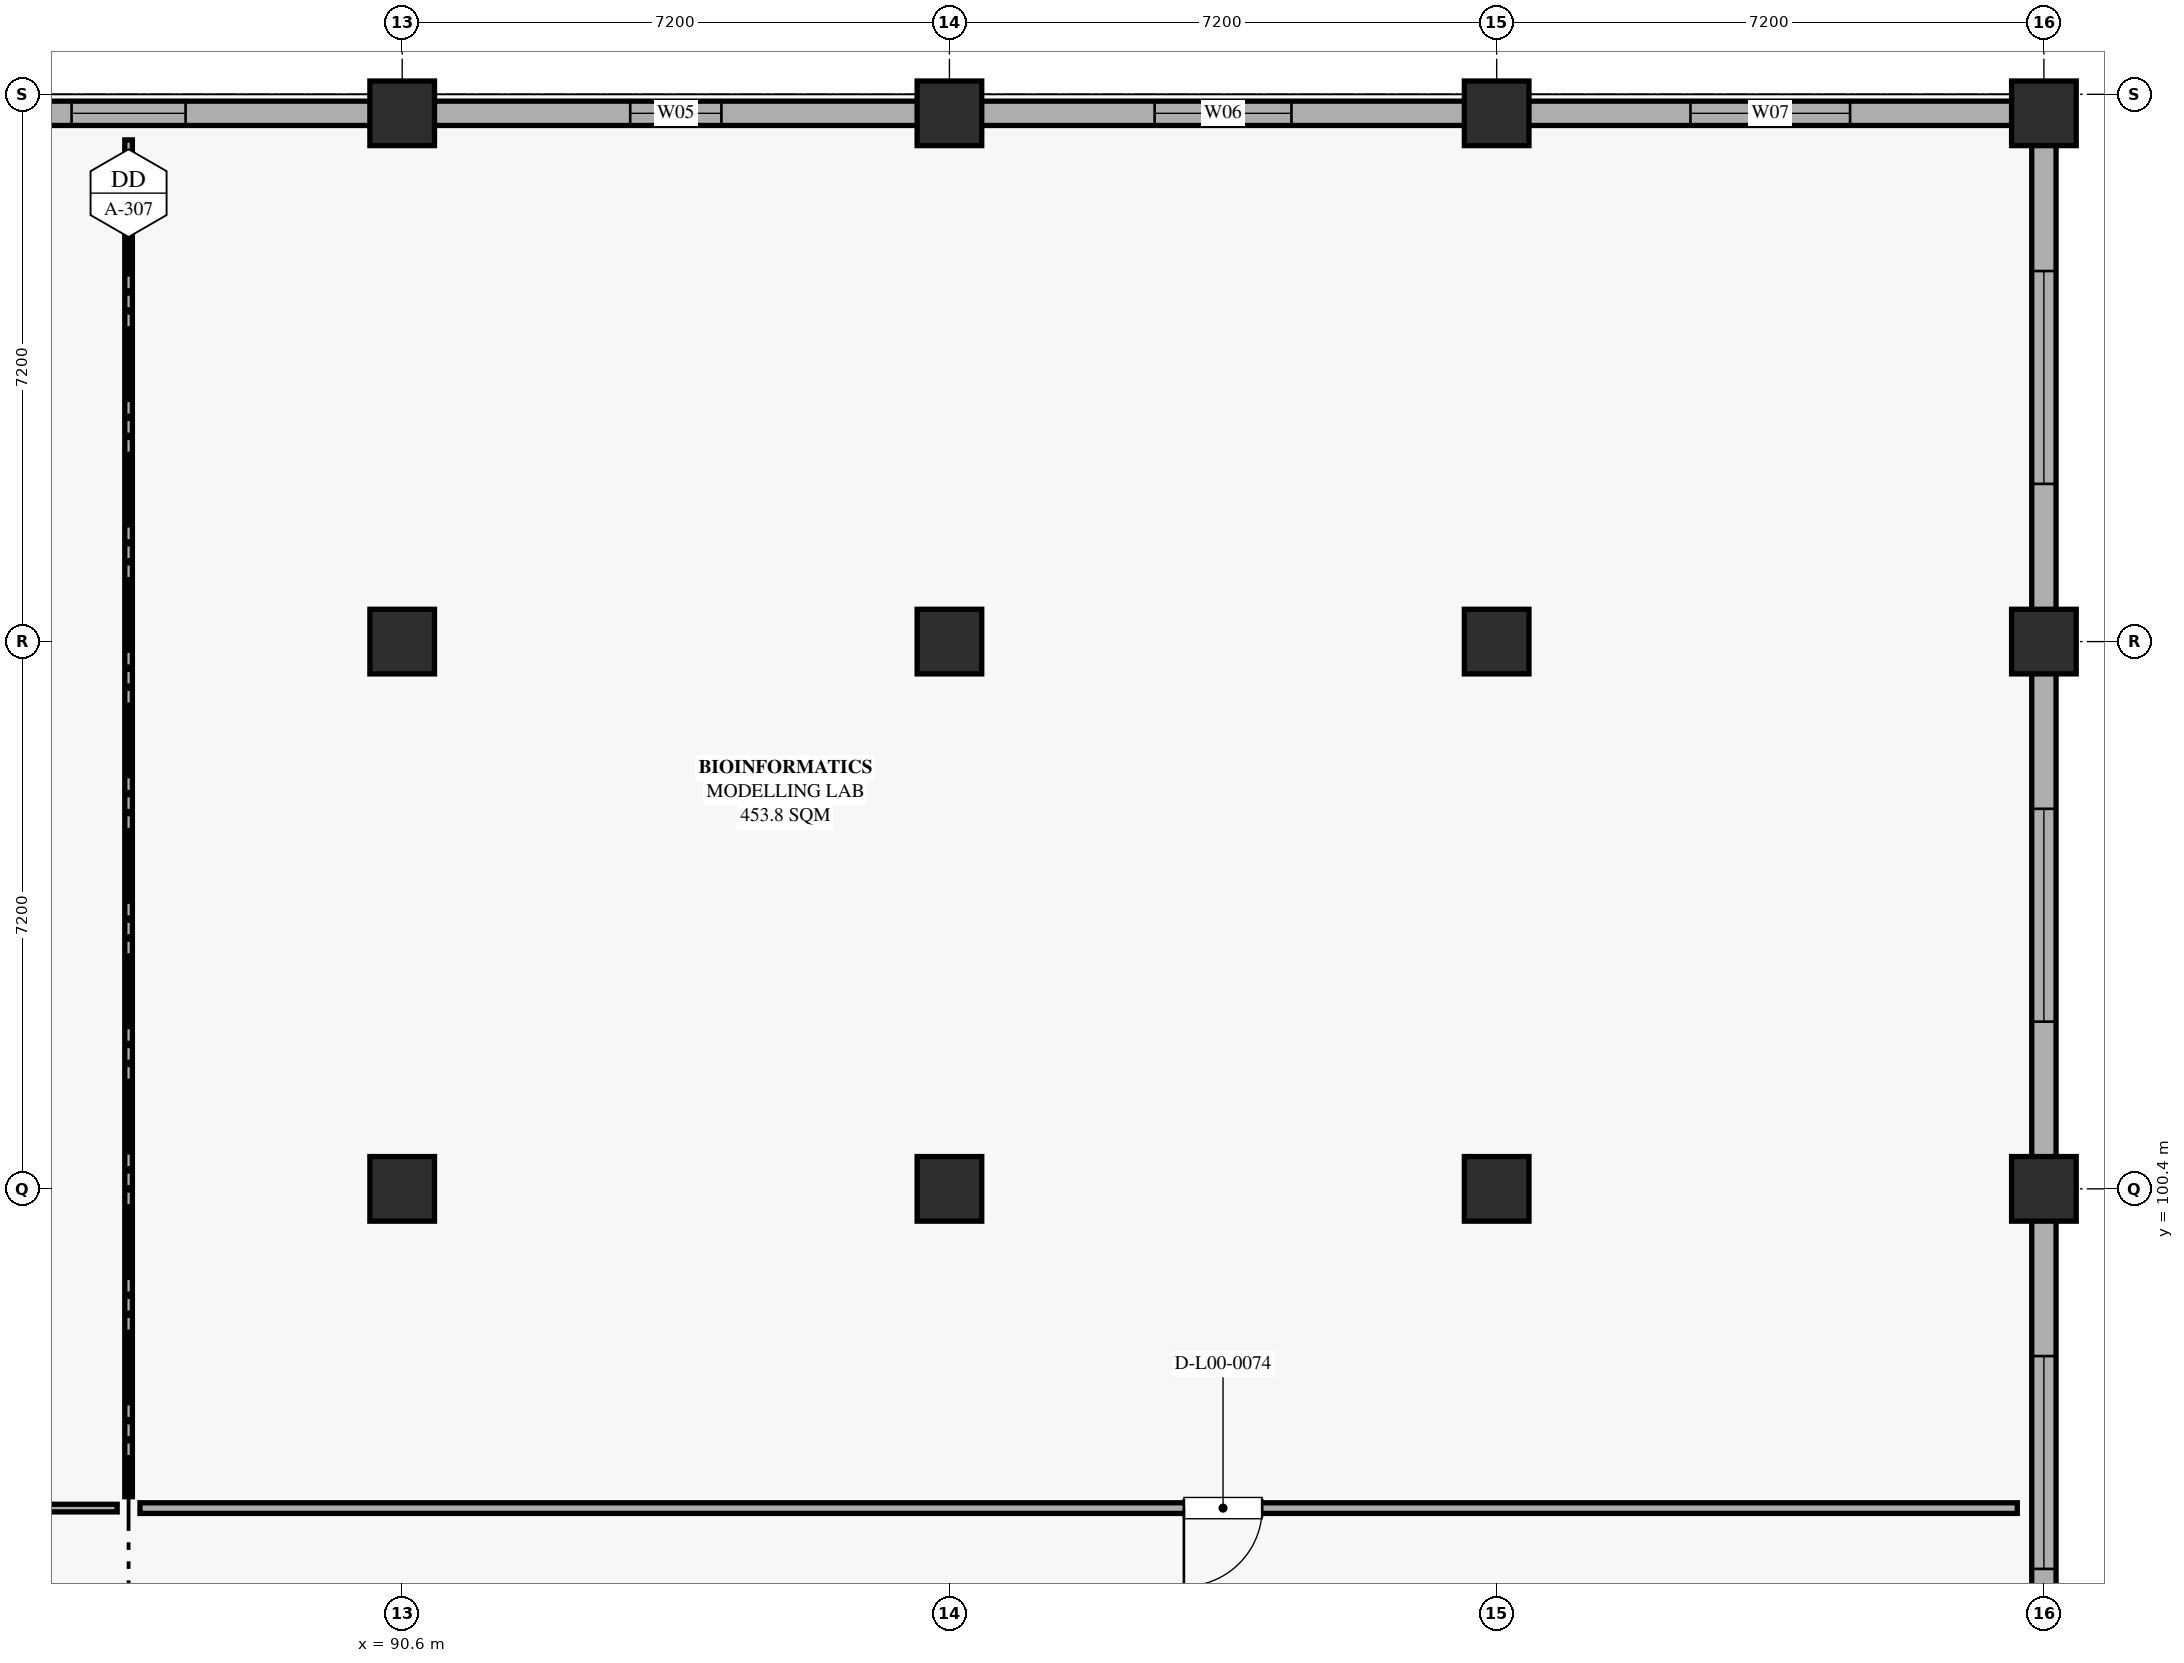
"""IFC4 building model, lengths in metres.
Left out: names, types, materials, properties, quantities, classifications, styles, units other than length and angle.
Written with IfcOpenShell. Run it as: python <this file> out.ifc"""

import sys

from ifc_helpers import new_model, si_unit, direction, frame, frame_2d, origin, origin_2d, place, context, subcontext, project, spatial, rectangle, extrude, element, fill, save


model = new_model("IFC4")
c1 = context("Model", 3, precision=1e-05, world=origin(), true_north=direction((0.0, 1.0)))
c2 = subcontext(c1, "Body", "Model", "MODEL_VIEW")
j1 = project(units=[si_unit("LENGTHUNIT", "METRE"), si_unit("PLANEANGLEUNIT", "RADIAN")], contexts=[c1])
p1 = place(None, origin())
s1 = spatial("IfcSite", under=j1, at=p1, CompositionType="ELEMENT")
p2 = place(p1, origin())
s2 = spatial("IfcBuilding", under=s1, at=p2, CompositionType="ELEMENT")
p3 = place(p2, origin())
s3 = spatial("IfcBuildingStorey", under=s2, at=p3, CompositionType="ELEMENT", Elevation=0.0)
for number, where, z_axis, x_axis in (
    (1, (90.6, 100.4, 0.0), (0.0, 0.0, 1.0), (1.0, 0.0, 0.0)),
    (2, (97.8, 100.4, 0.0), (0.0, 0.0, 1.0), (1.0, 0.0, 0.0)),
    (3, (105.0, 100.4, 0.0), (0.0, 0.0, 1.0), (1.0, 0.0, 0.0)),
    (4, (112.2, 100.4, 0.0), (0.0, 0.0, 1.0), (1.0, 0.0, 0.0)),
    (5, (90.6, 107.6, 0.0), (0.0, 0.0, 1.0), (1.0, 0.0, 0.0)),
    (6, (97.8, 107.6, 0.0), (0.0, 0.0, 1.0), (1.0, 0.0, 0.0)),
    (7, (105.0, 107.6, 0.0), (0.0, 0.0, 1.0), (1.0, 0.0, 0.0)),
    (8, (112.2, 107.6, 0.0), (0.0, 0.0, 1.0), (1.0, 0.0, 0.0)),
    (9, (90.6, 114.55, 0.0), (0.0, 0.0, 1.0), (1.0, 0.0, 0.0)),
    (10, (97.8, 114.55, 0.0), (0.0, 0.0, 1.0), (1.0, 0.0, 0.0)),
    (11, (105.0, 114.55, 0.0), (0.0, 0.0, 1.0), (1.0, 0.0, 0.0)),
    (12, (112.2, 114.55, 0.0), (0.0, 0.0, 1.0), (1.0, 0.0, 0.0)),
):
    element("IfcColumn", number, at=place(p3, frame(where, z_axis=z_axis, x_axis=x_axis)), inside=s3, PredefinedType="COLUMN", context=c2, shape_type="SweptSolid", body=[
        extrude(rectangle(XDim=0.85, YDim=0.85, at=origin_2d()), origin(), (0.0, 0.0, 1.0), 5.4),
    ])
p4 = place(p3, frame((112.2, 99.99, 0.0), z_axis=(0.0, 0.0, 1.0), x_axis=(0.0, -1.0, 0.0)))
e13 = element("IfcWall", 13, at=p4, inside=s3, PredefinedType="SOLIDWALL", context=c2, shape_type="SweptSolid", body=[
    extrude(rectangle(XDim=6.38, YDim=0.32, at=frame_2d((3.19, 0.0))), origin(), (0.0, 0.0, 1.0), 3.9),
])
p5 = place(p4, frame((1.79, 0.0, 0.9)))
e14 = element("IfcOpeningElement", 14, at=p5, cuts=e13, PredefinedType="OPENING", context=c2, shape_type="SweptSolid", body=[
    extrude(rectangle(XDim=2.8, YDim=2.2, at=frame_2d((1.4, 1.1))), frame((0.0, 0.17, 0.0), z_axis=(0.0, -1.0, 0.0), x_axis=(1.0, 0.0, 0.0)), (0.0, 0.0, 1.0), 0.34),
])
p6 = place(p3, frame((112.2, 107.19, 0.0), z_axis=(0.0, 0.0, 1.0), x_axis=(0.0, -1.0, 0.0)))
e15 = element("IfcWall", 15, at=p6, inside=s3, PredefinedType="SOLIDWALL", context=c2, shape_type="SweptSolid", body=[
    extrude(rectangle(XDim=6.38, YDim=0.32, at=frame_2d((3.19, 0.0))), origin(), (0.0, 0.0, 1.0), 3.9),
])
p7 = place(p6, frame((1.79, 0.0, 0.9)))
e16 = element("IfcOpeningElement", 16, at=p7, cuts=e15, PredefinedType="OPENING", context=c2, shape_type="SweptSolid", body=[
    extrude(rectangle(XDim=2.8, YDim=2.2, at=frame_2d((1.4, 1.1))), frame((0.0, 0.17, 0.0), z_axis=(0.0, -1.0, 0.0), x_axis=(1.0, 0.0, 0.0)), (0.0, 0.0, 1.0), 0.34),
])
p8 = place(p3, frame((112.2, 114.14, 0.0), z_axis=(0.0, 0.0, 1.0), x_axis=(0.0, -1.0, 0.0)))
e17 = element("IfcWall", 17, at=p8, inside=s3, PredefinedType="SOLIDWALL", context=c2, shape_type="SweptSolid", body=[
    extrude(rectangle(XDim=6.13, YDim=0.32, at=frame_2d((3.065, 0.0))), origin(), (0.0, 0.0, 1.0), 3.9),
])
p9 = place(p8, frame((1.665, 0.0, 0.9)))
e18 = element("IfcOpeningElement", 18, at=p9, cuts=e17, PredefinedType="OPENING", context=c2, shape_type="SweptSolid", body=[
    extrude(rectangle(XDim=2.8, YDim=2.2, at=frame_2d((1.4, 1.1))), frame((0.0, 0.17, 0.0), z_axis=(0.0, -1.0, 0.0), x_axis=(1.0, 0.0, 0.0)), (0.0, 0.0, 1.0), 0.34),
])
p10 = place(p3, frame((83.81, 114.55, 0.0), z_axis=(0.0, 0.0, 1.0), x_axis=(1.0, 0.0, 0.0)))
e19 = element("IfcWall", 19, at=p10, inside=s3, PredefinedType="SOLIDWALL", context=c2, shape_type="SweptSolid", body=[
    extrude(rectangle(XDim=6.38, YDim=0.32, at=frame_2d((3.19, 0.0))), origin(), (0.0, 0.0, 1.0), 3.9),
])
p11 = place(p10, frame((2.44, 0.0, 0.9)))
e20 = element("IfcOpeningElement", 20, at=p11, cuts=e19, PredefinedType="OPENING", context=c2, shape_type="SweptSolid", body=[
    extrude(rectangle(XDim=1.5, YDim=2.4, at=frame_2d((0.75, 1.2))), frame((0.0, 0.17, 0.0), z_axis=(0.0, -1.0, 0.0), x_axis=(1.0, 0.0, 0.0)), (0.0, 0.0, 1.0), 0.34),
])
p12 = place(p3, frame((91.01, 114.55, 0.0), z_axis=(0.0, 0.0, 1.0), x_axis=(1.0, 0.0, 0.0)))
e21 = element("IfcWall", 21, at=p12, inside=s3, PredefinedType="SOLIDWALL", context=c2, shape_type="SweptSolid", body=[
    extrude(rectangle(XDim=6.38, YDim=0.32, at=frame_2d((3.19, 0.0))), origin(), (0.0, 0.0, 1.0), 3.9),
])
p13 = place(p12, frame((2.59, 0.0, 0.9)))
e22 = element("IfcOpeningElement", 22, at=p13, cuts=e21, PredefinedType="OPENING", context=c2, shape_type="SweptSolid", body=[
    extrude(rectangle(XDim=1.2, YDim=2.4, at=frame_2d((0.6, 1.2))), frame((0.0, 0.17, 0.0), z_axis=(0.0, -1.0, 0.0), x_axis=(1.0, 0.0, 0.0)), (0.0, 0.0, 1.0), 0.34),
])
p14 = place(p3, frame((98.21, 114.55, 0.0), z_axis=(0.0, 0.0, 1.0), x_axis=(1.0, 0.0, 0.0)))
e23 = element("IfcWall", 23, at=p14, inside=s3, PredefinedType="SOLIDWALL", context=c2, shape_type="SweptSolid", body=[
    extrude(rectangle(XDim=6.38, YDim=0.32, at=frame_2d((3.19, 0.0))), origin(), (0.0, 0.0, 1.0), 3.9),
])
p15 = place(p14, frame((2.29, 0.0, 0.9)))
e24 = element("IfcOpeningElement", 24, at=p15, cuts=e23, PredefinedType="OPENING", context=c2, shape_type="SweptSolid", body=[
    extrude(rectangle(XDim=1.8, YDim=2.1, at=frame_2d((0.9, 1.05))), frame((0.0, 0.17, 0.0), z_axis=(0.0, -1.0, 0.0), x_axis=(1.0, 0.0, 0.0)), (0.0, 0.0, 1.0), 0.34),
])
p16 = place(p3, frame((105.41, 114.55, 0.0), z_axis=(0.0, 0.0, 1.0), x_axis=(1.0, 0.0, 0.0)))
e25 = element("IfcWall", 25, at=p16, inside=s3, PredefinedType="SOLIDWALL", context=c2, shape_type="SweptSolid", body=[
    extrude(rectangle(XDim=6.38, YDim=0.32, at=frame_2d((3.19, 0.0))), origin(), (0.0, 0.0, 1.0), 3.9),
])
p17 = place(p16, frame((2.14, 0.0, 0.9)))
e26 = element("IfcOpeningElement", 26, at=p17, cuts=e25, PredefinedType="OPENING", context=c2, shape_type="SweptSolid", body=[
    extrude(rectangle(XDim=2.1, YDim=2.1, at=frame_2d((1.05, 1.05))), frame((0.0, 0.17, 0.0), z_axis=(0.0, -1.0, 0.0), x_axis=(1.0, 0.0, 0.0)), (0.0, 0.0, 1.0), 0.34),
])
p18 = place(p3, frame((86.85, 96.2, 0.0), z_axis=(0.0, 0.0, 1.0), x_axis=(-1.0, 0.0, 0.0)))
e27 = element("IfcWall", 27, at=p18, inside=s3, PredefinedType="PARTITIONING", context=c2, shape_type="SweptSolid", body=[
    extrude(rectangle(XDim=24.7, YDim=0.1, at=frame_2d((12.35, 0.0))), origin(), (0.0, 0.0, 1.0), 3.88),
])
p19 = place(p18, frame((13.735, 0.0, 0.0)))
e28 = element("IfcOpeningElement", 28, at=p19, cuts=e27, PredefinedType="OPENING", context=c2, shape_type="SweptSolid", body=[
    extrude(rectangle(XDim=1.03, YDim=2.16, at=frame_2d((0.515, 1.08))), frame((0.0, 0.06, 0.0), z_axis=(0.0, -1.0, 0.0), x_axis=(1.0, 0.0, 0.0)), (0.0, 0.0, 1.0), 0.12),
])
p20 = place(p3, frame((87.0, 114.2, 0.0), z_axis=(0.0, 0.0, 1.0), x_axis=(0.0, -1.0, 0.0)))
e29 = element("IfcWall", 29, at=p20, inside=s3, PredefinedType="PARTITIONING", context=c2, shape_type="SweptSolid", body=[
    extrude(rectangle(XDim=17.85, YDim=0.1, at=frame_2d((8.925, 0.0))), origin(), (0.0, 0.0, 1.0), 3.88),
])
p21 = place(p3, frame((111.85, 96.2, 0.0), z_axis=(0.0, 0.0, 1.0), x_axis=(-1.0, 0.0, 0.0)))
e30 = element("IfcWall", 30, at=p21, inside=s3, PredefinedType="PARTITIONING", context=c2, shape_type="SweptSolid", body=[
    extrude(rectangle(XDim=24.7, YDim=0.14, at=frame_2d((12.35, 0.0))), origin(), (0.0, 0.0, 1.0), 3.88),
])
p22 = place(p21, frame((9.935, 0.0, 0.0)))
e31 = element("IfcOpeningElement", 31, at=p22, cuts=e30, PredefinedType="OPENING", context=c2, shape_type="SweptSolid", body=[
    extrude(rectangle(XDim=1.03, YDim=2.22, at=frame_2d((0.515, 1.11))), frame((0.0, 0.08, 0.0), z_axis=(0.0, -1.0, 0.0), x_axis=(1.0, 0.0, 0.0)), (0.0, 0.0, 1.0), 0.16),
])
p23 = place(p5, origin())
e32 = element("IfcWindow", 32, at=p23, inside=s3, PartitioningType="DOUBLE_PANEL_VERTICAL", PredefinedType="WINDOW", context=c2, shape_type="SweptSolid", body=[
    extrude(rectangle(XDim=2.8, YDim=2.2, at=frame_2d((1.4, 1.1))), frame((0.0, 0.03, 0.0), z_axis=(0.0, -1.0, 0.0), x_axis=(1.0, 0.0, 0.0)), (0.0, 0.0, 1.0), 0.06),
])
fill(e14, e32)
p24 = place(p7, origin())
e33 = element("IfcWindow", 33, at=p24, inside=s3, PartitioningType="DOUBLE_PANEL_VERTICAL", PredefinedType="WINDOW", context=c2, shape_type="SweptSolid", body=[
    extrude(rectangle(XDim=2.8, YDim=2.2, at=frame_2d((1.4, 1.1))), frame((0.0, 0.03, 0.0), z_axis=(0.0, -1.0, 0.0), x_axis=(1.0, 0.0, 0.0)), (0.0, 0.0, 1.0), 0.06),
])
fill(e16, e33)
p25 = place(p9, origin())
e34 = element("IfcWindow", 34, at=p25, inside=s3, PartitioningType="DOUBLE_PANEL_VERTICAL", PredefinedType="WINDOW", context=c2, shape_type="SweptSolid", body=[
    extrude(rectangle(XDim=2.8, YDim=2.2, at=frame_2d((1.4, 1.1))), frame((0.0, 0.03, 0.0), z_axis=(0.0, -1.0, 0.0), x_axis=(1.0, 0.0, 0.0)), (0.0, 0.0, 1.0), 0.06),
])
fill(e18, e34)
p26 = place(p11, origin())
e35 = element("IfcWindow", 35, at=p26, inside=s3, PartitioningType="SINGLE_PANEL", PredefinedType="WINDOW", context=c2, shape_type="SweptSolid", body=[
    extrude(rectangle(XDim=1.5, YDim=2.4, at=frame_2d((0.75, 1.2))), frame((0.0, 0.03, 0.0), z_axis=(0.0, -1.0, 0.0), x_axis=(1.0, 0.0, 0.0)), (0.0, 0.0, 1.0), 0.06),
])
fill(e20, e35)
p27 = place(p13, origin())
e36 = element("IfcWindow", 36, at=p27, inside=s3, PartitioningType="SINGLE_PANEL", PredefinedType="WINDOW", context=c2, shape_type="SweptSolid", body=[
    extrude(rectangle(XDim=1.2, YDim=2.4, at=frame_2d((0.6, 1.2))), frame((0.0, 0.03, 0.0), z_axis=(0.0, -1.0, 0.0), x_axis=(1.0, 0.0, 0.0)), (0.0, 0.0, 1.0), 0.06),
])
fill(e22, e36)
p28 = place(p15, origin())
e37 = element("IfcWindow", 37, at=p28, inside=s3, PartitioningType="DOUBLE_PANEL_VERTICAL", PredefinedType="WINDOW", context=c2, shape_type="SweptSolid", body=[
    extrude(rectangle(XDim=1.8, YDim=2.1, at=frame_2d((0.9, 1.05))), frame((0.0, 0.03, 0.0), z_axis=(0.0, -1.0, 0.0), x_axis=(1.0, 0.0, 0.0)), (0.0, 0.0, 1.0), 0.06),
])
fill(e24, e37)
p29 = place(p17, origin())
e38 = element("IfcWindow", 38, at=p29, inside=s3, PartitioningType="DOUBLE_PANEL_VERTICAL", PredefinedType="WINDOW", context=c2, shape_type="SweptSolid", body=[
    extrude(rectangle(XDim=2.1, YDim=2.1, at=frame_2d((1.05, 1.05))), frame((0.0, 0.03, 0.0), z_axis=(0.0, -1.0, 0.0), x_axis=(1.0, 0.0, 0.0)), (0.0, 0.0, 1.0), 0.06),
])
fill(e26, e38)
p30 = place(p22, origin())
e39 = element("IfcDoor", 39, at=p30, inside=s3, OperationType="SINGLE_SWING_RIGHT", PredefinedType="DOOR", context=c2, shape_type="SweptSolid", body=[
    extrude(rectangle(XDim=1.03, YDim=2.22, at=frame_2d((0.515, 1.11))), frame((0.0, 0.025, 0.0), z_axis=(0.0, -1.0, 0.0), x_axis=(1.0, 0.0, 0.0)), (0.0, 0.0, 1.0), 0.05),
])
fill(e31, e39)
save(model, sys.argv[1])
